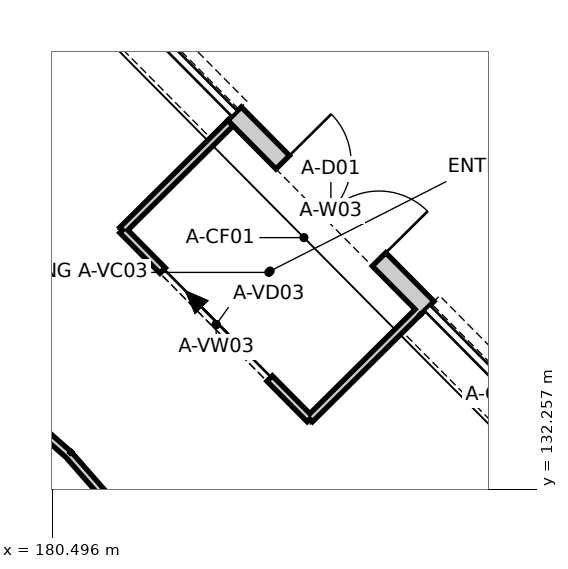
"""IFC4 building model, lengths in metres.
Left out: names, types, materials, properties, quantities, classifications, styles, units other than length and angle.
Written with IfcOpenShell. Run it as: python <this file> out.ifc"""

import sys

from ifc_helpers import new_model, si_unit, direction, frame, frame_2d, origin, place, context, subcontext, project, spatial, polyline, rectangle, outline, extrude, element, fill, save


model = new_model("IFC4")
c1 = context("Model", 3, precision=1e-05, world=origin(), true_north=direction((0.0, 1.0)))
c2 = subcontext(c1, "Body", "Model", "MODEL_VIEW")
j1 = project(units=[si_unit("LENGTHUNIT", "METRE"), si_unit("PLANEANGLEUNIT", "RADIAN")], contexts=[c1])
p1 = place(None, origin())
s1 = spatial("IfcSite", under=j1, at=p1, CompositionType="ELEMENT")
p2 = place(p1, origin())
s2 = spatial("IfcBuilding", under=s1, at=p2, CompositionType="ELEMENT")
p3 = place(p2, origin())
s3 = spatial("IfcBuildingStorey", under=s2, at=p3, CompositionType="ELEMENT", Elevation=0.0)
p4 = place(p3, frame((185.432, 134.641, 0.0), z_axis=(0.0, 0.0, 1.0), x_axis=(-0.704014348295, 0.710185748516, 0.0)))
e1 = element("IfcWall", 1, at=p4, inside=s3, PredefinedType="SOLIDWALL", context=c2, shape_type="SweptSolid", body=[
    extrude(rectangle(XDim=3.6, YDim=0.25, at=frame_2d((1.8, 0.0))), origin(), (0.0, 0.0, 1.0), 4.338),
])
p5 = place(p4, frame((0.9, 0.0, 0.0)))
e2 = element("IfcOpeningElement", 2, at=p5, cuts=e1, PredefinedType="OPENING", context=c2, shape_type="SweptSolid", body=[
    extrude(rectangle(XDim=1.8, YDim=2.4, at=frame_2d((0.9, 1.2))), frame((0.0, 0.135, 0.0), z_axis=(0.0, -1.0, 0.0), x_axis=(1.0, 0.0, 0.0)), (0.0, 0.0, 1.0), 0.27),
])
p6 = place(p3, frame((185.308, 134.589, 0.0), z_axis=(0.0, 0.0, 1.0), x_axis=(-0.710212756129, -0.703987102887, 0.0)))
e3 = element("IfcWall", 3, at=p6, inside=s3, PredefinedType="PARTITIONING", context=c2, shape_type="SweptSolid", body=[
    extrude(outline(polyline([(0.0, -0.05), (1.95, -0.05), (2.05, 0.05), (0.0, 0.05), (0.0, -0.05)])), origin(), (0.0, 0.0, 1.0), 3.0),
])
p7 = place(p3, frame((183.887, 133.181, 0.0), z_axis=(0.0, 0.0, 1.0), x_axis=(-0.704030927659, 0.71016931284, 0.0)))
e4 = element("IfcWall", 4, at=p7, inside=s3, PredefinedType="PARTITIONING", context=c2, shape_type="SweptSolid", body=[
    extrude(outline(polyline([(0.05, -0.05), (3.45, -0.05), (3.55, 0.05), (-0.05, 0.05), (0.05, -0.05)])), origin(), (0.0, 0.0, 1.0), 3.0),
])
p8 = place(p7, frame((0.75, 0.0, 0.0)))
e5 = element("IfcOpeningElement", 5, at=p8, cuts=e4, PredefinedType="OPENING", context=c2, shape_type="SweptSolid", body=[
    extrude(rectangle(XDim=2.0, YDim=2.4, at=frame_2d((1.0, 1.2))), frame((0.0, 0.06, 0.0), z_axis=(0.0, -1.0, 0.0), x_axis=(1.0, 0.0, 0.0)), (0.0, 0.0, 1.0), 0.12),
])
p9 = place(p3, frame((181.423, 135.667, 0.0), z_axis=(0.0, 0.0, 1.0), x_axis=(0.710212756129, 0.703987102887, 0.0)))
e6 = element("IfcWall", 6, at=p9, inside=s3, PredefinedType="PARTITIONING", context=c2, shape_type="SweptSolid", body=[
    extrude(outline(polyline([(0.05, -0.05), (2.0, -0.05), (2.0, 0.05), (-0.05, 0.05), (0.05, -0.05)])), origin(), (0.0, 0.0, 1.0), 3.0),
])
p10 = place(p3, frame((183.728, 129.276, 0.0), z_axis=(0.0, 0.0, 1.0), x_axis=(-0.659317088075, 0.751864999433, 0.0)))
e7 = element("IfcWall", 7, at=p10, inside=s3, PredefinedType="PARTITIONING", context=c2, shape_type="SweptSolid", body=[
    extrude(outline(polyline([(-0.003, -0.05), (4.575, -0.05), (4.568, 0.05), (0.003, 0.05), (-0.003, -0.05)])), origin(), (0.0, 0.0, 1.0), 10.842),
])
p11 = place(p3, frame((180.713, 132.713, 0.0), z_axis=(0.0, 0.0, 1.0), x_axis=(-0.751864999433, 0.659317088075, 0.0)))
e8 = element("IfcWall", 8, at=p11, inside=s3, PredefinedType="PARTITIONING", context=c2, shape_type="SweptSolid", body=[
    extrude(outline(polyline([(-0.003, -0.05), (4.575, -0.05), (4.568, 0.05), (0.003, 0.05), (-0.003, -0.05)])), origin(), (0.0, 0.0, 1.0), 10.841),
])
p12 = place(p5, frame((1.8, 0.0, 0.0), z_axis=(0.0, 0.0, 1.0), x_axis=(-1.0, 0.0, 0.0)))
e9 = element("IfcDoor", 9, at=p12, inside=s3, OperationType="DOUBLE_DOOR_SINGLE_SWING", PredefinedType="DOOR", context=c2, shape_type="SweptSolid", body=[
    extrude(rectangle(XDim=1.8, YDim=2.4, at=frame_2d((0.9, 1.2))), frame((0.0, 0.025, 0.0), z_axis=(0.0, -1.0, 0.0), x_axis=(1.0, 0.0, 0.0)), (0.0, 0.0, 1.0), 0.05),
])
fill(e2, e9)
p13 = place(p8, origin())
e10 = element("IfcDoor", 10, at=p13, inside=s3, OperationType="DOUBLE_DOOR_SLIDING", PredefinedType="DOOR", context=c2, shape_type="SweptSolid", body=[
    extrude(rectangle(XDim=2.0, YDim=2.4, at=frame_2d((1.0, 1.2))), frame((0.0, 0.025, 0.0), z_axis=(0.0, -1.0, 0.0), x_axis=(1.0, 0.0, 0.0)), (0.0, 0.0, 1.0), 0.05),
])
fill(e5, e10)
save(model, sys.argv[1])
